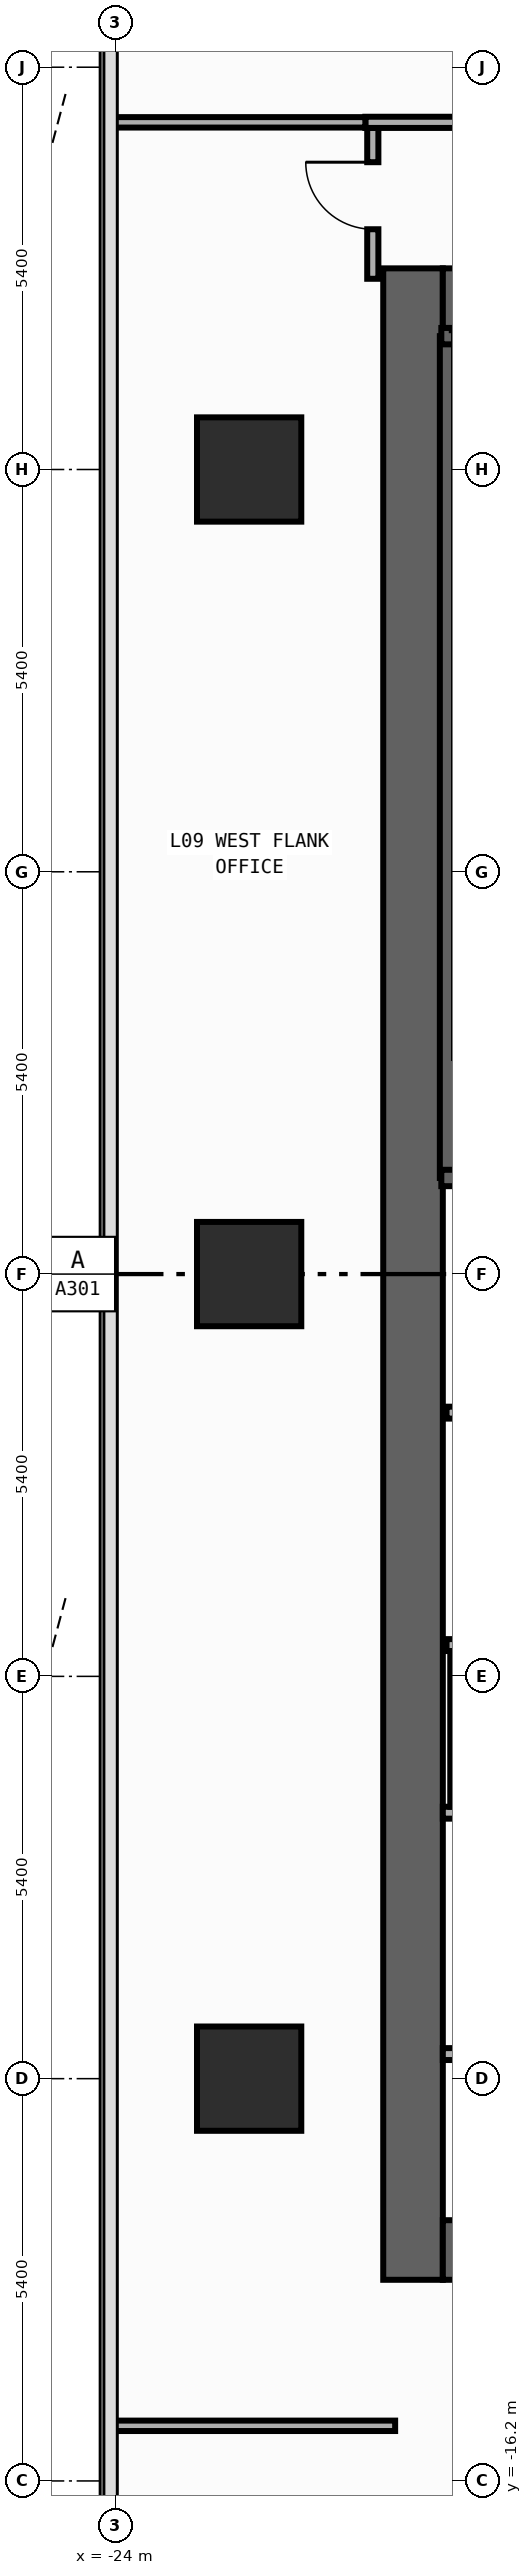
"""IFC4 building model, lengths in metres.
Left out: names, types, materials, properties, quantities, classifications, styles, units other than length and angle.
Written with IfcOpenShell. Run it as: python <this file> out.ifc"""

import sys

from ifc_helpers import new_model, si_unit, direction, frame, frame_2d, origin, origin_2d, place, context, subcontext, project, spatial, rectangle, extrude, element, fill, save


model = new_model("IFC4")
c1 = context("Model", 3, precision=1e-05, world=origin(), true_north=direction((0.0, 1.0)))
c2 = subcontext(c1, "Body", "Model", "MODEL_VIEW")
j1 = project(units=[si_unit("LENGTHUNIT", "METRE"), si_unit("PLANEANGLEUNIT", "RADIAN")], contexts=[c1])
p1 = place(None, origin())
s1 = spatial("IfcSite", under=j1, at=p1, CompositionType="ELEMENT")
p2 = place(p1, origin())
s2 = spatial("IfcBuilding", under=s1, at=p2, CompositionType="ELEMENT")
p3 = place(p2, frame((0.0, 0.0, 38.6)))
s3 = spatial("IfcBuildingStorey", under=s2, at=p3, CompositionType="ELEMENT", Elevation=38.6)
p4 = place(p3, frame((-20.0, -13.5, 0.0), z_axis=(0.0, 0.0, 1.0), x_axis=(0.0, 1.0, 0.0)))
e1 = element("IfcWall", 1, at=p4, inside=s3, PredefinedType="SHEAR", context=c2, shape_type="SweptSolid", body=[
    extrude(rectangle(XDim=27.0, YDim=0.8, at=frame_2d((13.5, 0.0))), origin(), (0.0, 0.0, 1.0), 3.94),
])
for number, where, z_axis, x_axis in (
    (2, (-19.6, -13.1, 0.0), (0.0, 0.0, 1.0), (1.0, 0.0, 0.0)),
    (3, (-19.6, 13.1, 0.0), (0.0, 0.0, 1.0), (1.0, 0.0, 0.0)),
):
    element("IfcWall", number, at=place(p3, frame(where, z_axis=z_axis, x_axis=x_axis)), inside=s3, PredefinedType="SHEAR", context=c2, shape_type="SweptSolid", body=[
        extrude(rectangle(XDim=6.8, YDim=0.8, at=frame_2d((3.4, 0.0))), origin(), (0.0, 0.0, 1.0), 3.94),
    ])
p5 = place(p3, frame((-19.53, 1.29, 0.0), z_axis=(0.0, 0.0, 1.0), x_axis=(0.0, 1.0, 0.0)))
e4 = element("IfcWall", 4, at=p5, inside=s3, PredefinedType="SHEAR", context=c2, shape_type="SweptSolid", body=[
    extrude(rectangle(XDim=11.3, YDim=0.22, at=frame_2d((5.65, 0.0))), origin(), (0.0, 0.0, 1.0), 3.94),
])
p6 = place(p3, frame((-19.62, 12.59, 0.0), z_axis=(0.0, 0.0, 1.0), x_axis=(1.0, 0.0, 0.0)))
e5 = element("IfcWall", 5, at=p6, inside=s3, PredefinedType="SHEAR", context=c2, shape_type="SweptSolid", body=[
    extrude(rectangle(XDim=3.915, YDim=0.22, at=frame_2d((1.958, 0.0))), origin(), (0.0, 0.0, 1.0), 3.94),
])
p7 = place(p3, frame((-19.62, 1.29, 0.0), z_axis=(0.0, 0.0, 1.0), x_axis=(1.0, 0.0, 0.0)))
e6 = element("IfcWall", 6, at=p7, inside=s3, PredefinedType="SHEAR", context=c2, shape_type="SweptSolid", body=[
    extrude(rectangle(XDim=3.915, YDim=0.22, at=frame_2d((1.958, 0.0))), origin(), (0.0, 0.0, 1.0), 3.94),
])
p8 = place(p7, frame((1.08, 0.0, 0.0)))
e7 = element("IfcOpeningElement", 7, at=p8, cuts=e6, PredefinedType="OPENING", context=c2, shape_type="SweptSolid", body=[
    extrude(rectangle(XDim=1.1, YDim=2.2, at=frame_2d((0.55, 1.1))), frame((0.0, 0.12, 0.0), z_axis=(0.0, -1.0, 0.0), x_axis=(1.0, 0.0, 0.0)), (0.0, 0.0, 1.0), 0.24),
])
for number, where, z_axis, x_axis in (
    (8, (-22.2, -10.8, 0.0), (0.0, 0.0, 1.0), (1.0, 0.0, 0.0)),
    (9, (-22.2, 0.0, 0.0), (0.0, 0.0, 1.0), (1.0, 0.0, 0.0)),
    (10, (-22.2, 10.8, 0.0), (0.0, 0.0, 1.0), (1.0, 0.0, 0.0)),
):
    element("IfcColumn", number, at=place(p3, frame(where, z_axis=z_axis, x_axis=x_axis)), inside=s3, PredefinedType="COLUMN", context=c2, shape_type="SweptSolid", body=[
        extrude(rectangle(XDim=1.4, YDim=1.4, at=origin_2d()), origin(), (0.0, 0.0, 1.0), 4.2),
    ])
p9 = place(p3, frame((-19.55, -1.86, 0.0), z_axis=(0.0, 0.0, 1.0), x_axis=(1.0, 0.0, 0.0)))
e11 = element("IfcWall", 11, at=p9, inside=s3, PredefinedType="STANDARD", context=c2, shape_type="SweptSolid", body=[
    extrude(rectangle(XDim=3.8, YDim=0.16, at=frame_2d((1.9, 0.0))), origin(), (0.0, 0.0, 1.0), 3.94),
])
p10 = place(p9, frame((1.18, 0.0, 0.0)))
e12 = element("IfcOpeningElement", 12, at=p10, cuts=e11, PredefinedType="OPENING", context=c2, shape_type="SweptSolid", body=[
    extrude(rectangle(XDim=1.15, YDim=2.2, at=frame_2d((0.575, 1.1))), frame((0.0, 0.09, 0.0), z_axis=(0.0, -1.0, 0.0), x_axis=(1.0, 0.0, 0.0)), (0.0, 0.0, 1.0), 0.18),
])
p11 = place(p3, frame((-19.55, -4.98, 0.0), z_axis=(0.0, 0.0, 1.0), x_axis=(1.0, 0.0, 0.0)))
e13 = element("IfcWall", 13, at=p11, inside=s3, PredefinedType="STANDARD", context=c2, shape_type="SweptSolid", body=[
    extrude(rectangle(XDim=3.8, YDim=0.16, at=frame_2d((1.9, 0.0))), origin(), (0.0, 0.0, 1.0), 3.94),
])
for number, where, z_axis, x_axis in (
    (14, (-19.6, -10.47, 0.0), (0.0, 0.0, 1.0), (1.0, 0.0, 0.0)),
    (15, (-19.6, -7.23, 0.0), (0.0, 0.0, 1.0), (1.0, 0.0, 0.0)),
):
    element("IfcWall", number, at=place(p3, frame(where, z_axis=z_axis, x_axis=x_axis)), inside=s3, PredefinedType="PARTITIONING", context=c2, shape_type="SweptSolid", body=[
        extrude(rectangle(XDim=2.29, YDim=0.16, at=frame_2d((1.145, 0.0))), origin(), (0.0, 0.0, 1.0), 3.94),
    ])
p12 = place(p3, frame((-20.54, 13.36, 0.0), z_axis=(0.0, 0.0, 1.0), x_axis=(0.0, 1.0, 0.0)))
e16 = element("IfcWall", 16, at=p12, inside=s3, PredefinedType="PARTITIONING", context=c2, shape_type="SweptSolid", body=[
    extrude(rectangle(XDim=2.025, YDim=0.15, at=frame_2d((1.012, 0.0))), origin(), (0.0, 0.0, 1.0), 3.94),
])
p13 = place(p12, frame((0.665, 0.0, 0.0)))
e17 = element("IfcOpeningElement", 17, at=p13, cuts=e16, PredefinedType="OPENING", context=c2, shape_type="SweptSolid", body=[
    extrude(rectangle(XDim=0.9, YDim=2.15, at=frame_2d((0.45, 1.075))), frame((0.0, 0.085, 0.0), z_axis=(0.0, -1.0, 0.0), x_axis=(1.0, 0.0, 0.0)), (0.0, 0.0, 1.0), 0.17),
])
p14 = place(p3, frame((-20.64, 15.46, 0.0), z_axis=(0.0, 0.0, 1.0), x_axis=(1.0, 0.0, 0.0)))
e18 = element("IfcWall", 18, at=p14, inside=s3, PredefinedType="PARTITIONING", context=c2, shape_type="SweptSolid", body=[
    extrude(rectangle(XDim=8.65, YDim=0.15, at=frame_2d((4.325, 0.0))), origin(), (0.0, 0.0, 1.0), 3.94),
])
p15 = place(p14, frame((2.871, 0.0, 0.0)))
e19 = element("IfcOpeningElement", 19, at=p15, cuts=e18, PredefinedType="OPENING", context=c2, shape_type="SweptSolid", body=[
    extrude(rectangle(XDim=0.9, YDim=2.15, at=frame_2d((0.45, 1.075))), frame((0.0, 0.085, 0.0), z_axis=(0.0, -1.0, 0.0), x_axis=(1.0, 0.0, 0.0)), (0.0, 0.0, 1.0), 0.17),
])
p16 = place(p3, frame((-24.055, 15.46, 0.0), z_axis=(0.0, 0.0, 1.0), x_axis=(1.0, 0.0, 0.0)))
e20 = element("IfcWall", 20, at=p16, inside=s3, PredefinedType="PARTITIONING", context=c2, shape_type="SweptSolid", body=[
    extrude(rectangle(XDim=3.415, YDim=0.14, at=frame_2d((1.708, 0.0))), origin(), (0.0, 0.0, 1.0), 3.94),
])
p17 = place(p3, frame((-24.055, -15.46, 0.0), z_axis=(0.0, 0.0, 1.0), x_axis=(1.0, 0.0, 0.0)))
e21 = element("IfcWall", 21, at=p17, inside=s3, PredefinedType="PARTITIONING", context=c2, shape_type="SweptSolid", body=[
    extrude(rectangle(XDim=3.815, YDim=0.14, at=frame_2d((1.907, 0.0))), origin(), (0.0, 0.0, 1.0), 3.94),
])
p18 = place(p3, frame((-19.45, -7.15, 0.0), z_axis=(0.0, 0.0, 1.0), x_axis=(0.0, 1.0, 0.0)))
e22 = element("IfcWall", 22, at=p18, inside=s3, PredefinedType="PARTITIONING", context=c2, shape_type="SweptSolid", body=[
    extrude(rectangle(XDim=2.09, YDim=0.1, at=frame_2d((1.045, 0.0))), origin(), (0.0, 0.0, 1.0), 3.94),
])
p19 = place(p13, origin())
e23 = element("IfcDoor", 23, at=p19, inside=s3, OperationType="SINGLE_SWING_RIGHT", PredefinedType="DOOR", context=c2, shape_type="SweptSolid", body=[
    extrude(rectangle(XDim=0.9, YDim=2.15, at=frame_2d((0.45, 1.075))), frame((0.0, 0.025, 0.0), z_axis=(0.0, -1.0, 0.0), x_axis=(1.0, 0.0, 0.0)), (0.0, 0.0, 1.0), 0.05),
])
fill(e17, e23)
save(model, sys.argv[1])
